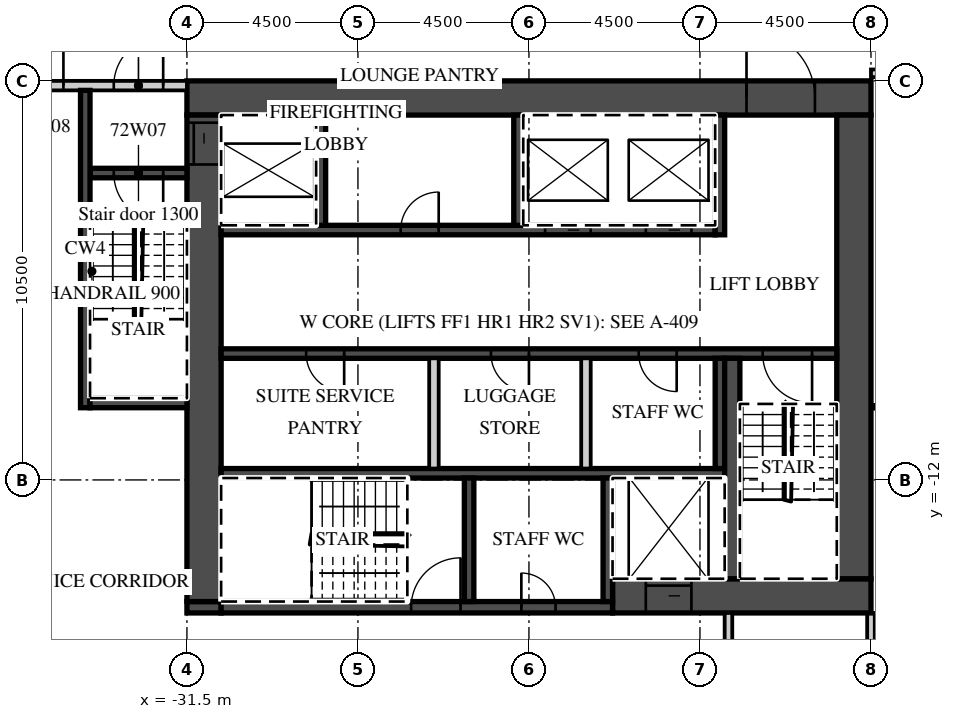
"""IFC4 building model, lengths in metres.
Left out: names, types, materials, properties, quantities, classifications, styles, units other than length and angle.
Written with IfcOpenShell. Run it as: python <this file> out.ifc"""

import sys

from ifc_helpers import new_model, si_unit, direction, frame, frame_2d, origin, place, context, subcontext, project, spatial, rectangle, extrude, element, fill, save


model = new_model("IFC4")
c1 = context("Model", 3, precision=1e-05, world=origin(), true_north=direction((0.0, 1.0)))
c2 = subcontext(c1, "Body", "Model", "MODEL_VIEW")
j1 = project(units=[si_unit("LENGTHUNIT", "METRE"), si_unit("PLANEANGLEUNIT", "RADIAN")], contexts=[c1])
p1 = place(None, origin())
s1 = spatial("IfcSite", under=j1, at=p1, CompositionType="ELEMENT")
p2 = place(p1, origin())
s2 = spatial("IfcBuilding", under=s1, at=p2, CompositionType="ELEMENT")
p3 = place(p2, frame((0.0, 0.0, 288.3)))
s3 = spatial("IfcBuildingStorey", under=s2, at=p3, CompositionType="ELEMENT", Elevation=288.3)
p4 = place(p3, frame((-13.5, -21.396, 0.0), z_axis=(0.0, 0.0, 1.0), x_axis=(0.0, 1.0, 0.0)))
e1 = element("IfcWall", 1, at=p4, inside=s3, PredefinedType="PARTITIONING", context=c2, shape_type="SweptSolid", body=[
    extrude(rectangle(XDim=5.896, YDim=0.2, at=frame_2d((2.948, 0.0))), origin(), (0.0, 0.0, 1.0), 3.02),
])
p5 = place(p3, frame((-13.5, -1.3, 0.0), z_axis=(0.0, 0.0, 1.0), x_axis=(1.0, 0.0, 0.0)))
e2 = element("IfcWall", 2, at=p5, inside=s3, PredefinedType="PARTITIONING", context=c2, shape_type="SweptSolid", body=[
    extrude(rectangle(XDim=50.293, YDim=0.2, at=frame_2d((25.146, 0.0))), origin(), (0.0, 0.0, 1.0), 3.02),
])
p6 = place(p5, frame((0.575, 0.0, 0.0)))
e3 = element("IfcOpeningElement", 3, at=p6, cuts=e2, PredefinedType="OPENING", context=c2, shape_type="SweptSolid", body=[
    extrude(rectangle(XDim=1.0, YDim=2.1, at=frame_2d((0.5, 1.05))), frame((0.0, 0.11, 0.0), z_axis=(0.0, -1.0, 0.0), x_axis=(1.0, 0.0, 0.0)), (0.0, 0.0, 1.0), 0.22),
])
p7 = place(p5, frame((9.863, 0.0, 0.0)))
e4 = element("IfcOpeningElement", 4, at=p7, cuts=e2, PredefinedType="OPENING", context=c2, shape_type="SweptSolid", body=[
    extrude(rectangle(XDim=1.2, YDim=2.1, at=frame_2d((0.6, 1.05))), frame((0.0, 0.11, 0.0), z_axis=(0.0, -1.0, 0.0), x_axis=(1.0, 0.0, 0.0)), (0.0, 0.0, 1.0), 0.22),
])
p8 = place(p5, frame((18.862, 0.0, 0.0)))
e5 = element("IfcOpeningElement", 5, at=p8, cuts=e2, PredefinedType="OPENING", context=c2, shape_type="SweptSolid", body=[
    extrude(rectangle(XDim=1.2, YDim=2.1, at=frame_2d((0.6, 1.05))), frame((0.0, 0.11, 0.0), z_axis=(0.0, -1.0, 0.0), x_axis=(1.0, 0.0, 0.0)), (0.0, 0.0, 1.0), 0.22),
])
p9 = place(p5, frame((25.45, 0.0, 0.0)))
e6 = element("IfcOpeningElement", 6, at=p9, cuts=e2, PredefinedType="OPENING", context=c2, shape_type="SweptSolid", body=[
    extrude(rectangle(XDim=1.0, YDim=2.1, at=frame_2d((0.5, 1.05))), frame((0.0, 0.11, 0.0), z_axis=(0.0, -1.0, 0.0), x_axis=(1.0, 0.0, 0.0)), (0.0, 0.0, 1.0), 0.22),
])
p10 = place(p5, frame((27.55, 0.0, 0.0)))
e7 = element("IfcOpeningElement", 7, at=p10, cuts=e2, PredefinedType="OPENING", context=c2, shape_type="SweptSolid", body=[
    extrude(rectangle(XDim=1.0, YDim=2.1, at=frame_2d((0.5, 1.05))), frame((0.0, 0.11, 0.0), z_axis=(0.0, -1.0, 0.0), x_axis=(1.0, 0.0, 0.0)), (0.0, 0.0, 1.0), 0.22),
])
p11 = place(p5, frame((33.938, 0.0, 0.0)))
e8 = element("IfcOpeningElement", 8, at=p11, cuts=e2, PredefinedType="OPENING", context=c2, shape_type="SweptSolid", body=[
    extrude(rectangle(XDim=1.2, YDim=2.1, at=frame_2d((0.6, 1.05))), frame((0.0, 0.11, 0.0), z_axis=(0.0, -1.0, 0.0), x_axis=(1.0, 0.0, 0.0)), (0.0, 0.0, 1.0), 0.22),
])
p12 = place(p5, frame((42.938, 0.0, 0.0)))
e9 = element("IfcOpeningElement", 9, at=p12, cuts=e2, PredefinedType="OPENING", context=c2, shape_type="SweptSolid", body=[
    extrude(rectangle(XDim=1.2, YDim=2.1, at=frame_2d((0.6, 1.05))), frame((0.0, 0.11, 0.0), z_axis=(0.0, -1.0, 0.0), x_axis=(1.0, 0.0, 0.0)), (0.0, 0.0, 1.0), 0.22),
])
p13 = place(p3, frame((-31.5, -1.95, 0.0), z_axis=(0.0, 0.0, 1.0), x_axis=(1.0, 0.0, 0.0)))
e10 = element("IfcWall", 10, at=p13, inside=s3, PredefinedType="SHEAR", context=c2, shape_type="SweptSolid", body=[
    extrude(rectangle(XDim=18.0, YDim=0.9, at=frame_2d((9.0, 0.0))), origin(), (0.0, 0.0, 1.0), 3.02),
])
p14 = place(p13, frame((14.725, 0.0, 0.0)))
e11 = element("IfcOpeningElement", 11, at=p14, cuts=e10, PredefinedType="OPENING", context=c2, shape_type="SweptSolid", body=[
    extrude(rectangle(XDim=1.8, YDim=2.1, at=frame_2d((0.9, 1.05))), frame((0.0, 0.46, 0.0), z_axis=(0.0, -1.0, 0.0), x_axis=(1.0, 0.0, 0.0)), (0.0, 0.0, 1.0), 0.92),
])
p15 = place(p3, frame((-20.3, -15.05, 0.0), z_axis=(0.0, 0.0, 1.0), x_axis=(1.0, 0.0, 0.0)))
e12 = element("IfcWall", 12, at=p15, inside=s3, PredefinedType="SHEAR", context=c2, shape_type="SweptSolid", body=[
    extrude(rectangle(XDim=6.8, YDim=0.9, at=frame_2d((3.4, 0.0))), origin(), (0.0, 0.0, 1.0), 3.02),
])
p16 = place(p15, frame((0.875, 0.0, 0.0)))
e13 = element("IfcOpeningElement", 13, at=p16, cuts=e12, PredefinedType="OPENING", context=c2, shape_type="SweptSolid", body=[
    extrude(rectangle(XDim=1.2, YDim=2.1, at=frame_2d((0.6, 1.05))), frame((0.0, 0.46, 0.0), z_axis=(0.0, -1.0, 0.0), x_axis=(1.0, 0.0, 0.0)), (0.0, 0.0, 1.0), 0.92),
])
p17 = place(p3, frame((-31.5, -15.35, 0.0), z_axis=(0.0, 0.0, 1.0), x_axis=(1.0, 0.0, 0.0)))
e14 = element("IfcWall", 14, at=p17, inside=s3, PredefinedType="SHEAR", context=c2, shape_type="SweptSolid", body=[
    extrude(rectangle(XDim=0.9, YDim=0.3, at=frame_2d((0.45, 0.0))), origin(), (0.0, 0.0, 1.0), 3.02),
])
p18 = place(p3, frame((-30.6, -15.35, 0.0), z_axis=(0.0, 0.0, 1.0), x_axis=(1.0, 0.0, 0.0)))
e15 = element("IfcWall", 15, at=p18, inside=s3, PredefinedType="SHEAR", context=c2, shape_type="SweptSolid", body=[
    extrude(rectangle(XDim=10.3, YDim=0.3, at=frame_2d((5.15, 0.0))), origin(), (0.0, 0.0, 1.0), 3.02),
])
p19 = place(p18, frame((5.0, 0.0, 0.0)))
e16 = element("IfcOpeningElement", 16, at=p19, cuts=e15, PredefinedType="OPENING", context=c2, shape_type="SweptSolid", body=[
    extrude(rectangle(XDim=1.3, YDim=2.1, at=frame_2d((0.65, 1.05))), frame((0.0, 0.16, 0.0), z_axis=(0.0, -1.0, 0.0), x_axis=(1.0, 0.0, 0.0)), (0.0, 0.0, 1.0), 0.32),
])
p20 = place(p18, frame((7.9, 0.0, 0.0)))
e17 = element("IfcOpeningElement", 17, at=p20, cuts=e15, PredefinedType="OPENING", context=c2, shape_type="SweptSolid", body=[
    extrude(rectangle(XDim=0.9, YDim=2.1, at=frame_2d((0.45, 1.05))), frame((0.0, 0.16, 0.0), z_axis=(0.0, -1.0, 0.0), x_axis=(1.0, 0.0, 0.0)), (0.0, 0.0, 1.0), 0.32),
])
p21 = place(p3, frame((-31.05, -15.2, 0.0), z_axis=(0.0, 0.0, 1.0), x_axis=(0.0, 1.0, 0.0)))
e18 = element("IfcWall", 18, at=p21, inside=s3, PredefinedType="SHEAR", context=c2, shape_type="SweptSolid", body=[
    extrude(rectangle(XDim=12.8, YDim=0.9, at=frame_2d((6.4, 0.0))), origin(), (0.0, 0.0, 1.0), 3.02),
])
p22 = place(p21, frame((11.5, 0.0, 0.0)))
e19 = element("IfcOpeningElement", 19, at=p22, cuts=e18, PredefinedType="OPENING", context=c2, shape_type="SweptSolid", body=[
    extrude(rectangle(XDim=1.1, YDim=2.1, at=frame_2d((0.55, 1.05))), frame((0.0, 0.46, 0.0), z_axis=(0.0, -1.0, 0.0), x_axis=(1.0, 0.0, 0.0)), (0.0, 0.0, 1.0), 0.92),
])
p23 = place(p3, frame((-13.95, -14.6, 0.0), z_axis=(0.0, 0.0, 1.0), x_axis=(0.0, 1.0, 0.0)))
e20 = element("IfcWall", 20, at=p23, inside=s3, PredefinedType="SHEAR", context=c2, shape_type="SweptSolid", body=[
    extrude(rectangle(XDim=12.2, YDim=0.9, at=frame_2d((6.1, 0.0))), origin(), (0.0, 0.0, 1.0), 3.02),
])
p24 = place(p3, frame((-30.6, -5.425, 0.0), z_axis=(0.0, 0.0, 1.0), x_axis=(1.0, 0.0, 0.0)))
e21 = element("IfcWall", 21, at=p24, inside=s3, PredefinedType="SHEAR", context=c2, shape_type="SweptSolid", body=[
    extrude(rectangle(XDim=13.0, YDim=0.25, at=frame_2d((6.5, 0.0))), origin(), (0.0, 0.0, 1.0), 3.02),
])
p25 = place(p24, frame((8.525, 0.0, 0.0)))
e22 = element("IfcOpeningElement", 22, at=p25, cuts=e21, PredefinedType="OPENING", context=c2, shape_type="SweptSolid", body=[
    extrude(rectangle(XDim=1.2, YDim=2.1, at=frame_2d((0.6, 1.05))), frame((0.0, 0.135, 0.0), z_axis=(0.0, -1.0, 0.0), x_axis=(1.0, 0.0, 0.0)), (0.0, 0.0, 1.0), 0.27),
])
p26 = place(p24, frame((11.175, 0.0, 0.0)))
e23 = element("IfcOpeningElement", 23, at=p26, cuts=e21, PredefinedType="OPENING", context=c2, shape_type="SweptSolid", body=[
    extrude(rectangle(XDim=1.2, YDim=2.1, at=frame_2d((0.6, 1.05))), frame((0.0, 0.135, 0.0), z_axis=(0.0, -1.0, 0.0), x_axis=(1.0, 0.0, 0.0)), (0.0, 0.0, 1.0), 0.27),
])
p27 = place(p24, frame((4.725, 0.0, 0.0)))
e24 = element("IfcOpeningElement", 24, at=p27, cuts=e21, PredefinedType="OPENING", context=c2, shape_type="SweptSolid", body=[
    extrude(rectangle(XDim=1.0, YDim=2.1, at=frame_2d((0.5, 1.05))), frame((0.0, 0.135, 0.0), z_axis=(0.0, -1.0, 0.0), x_axis=(1.0, 0.0, 0.0)), (0.0, 0.0, 1.0), 0.27),
])
p28 = place(p3, frame((-17.475, -5.55, 0.0), z_axis=(0.0, 0.0, 1.0), x_axis=(0.0, 1.0, 0.0)))
e25 = element("IfcWall", 25, at=p28, inside=s3, PredefinedType="SHEAR", context=c2, shape_type="SweptSolid", body=[
    extrude(rectangle(XDim=3.15, YDim=0.25, at=frame_2d((1.575, 0.0))), origin(), (0.0, 0.0, 1.0), 3.02),
])
for number, where, z_axis, x_axis in (
    (26, (-27.975, -5.3, 0.0), (0.0, 0.0, 1.0), (0.0, 1.0, 0.0)),
    (27, (-22.775, -5.3, 0.0), (0.0, 0.0, 1.0), (0.0, 1.0, 0.0)),
):
    element("IfcWall", number, at=place(p3, frame(where, z_axis=z_axis, x_axis=x_axis)), inside=s3, PredefinedType="SHEAR", context=c2, shape_type="SweptSolid", body=[
        extrude(rectangle(XDim=2.9, YDim=0.25, at=frame_2d((1.45, 0.0))), origin(), (0.0, 0.0, 1.0), 3.02),
    ])
p29 = place(p3, frame((-30.6, -8.675, 0.0), z_axis=(0.0, 0.0, 1.0), x_axis=(1.0, 0.0, 0.0)))
e28 = element("IfcWall", 28, at=p29, inside=s3, PredefinedType="SHEAR", context=c2, shape_type="SweptSolid", body=[
    extrude(rectangle(XDim=16.2, YDim=0.25, at=frame_2d((8.1, 0.0))), origin(), (0.0, 0.0, 1.0), 3.02),
])
p30 = place(p29, frame((14.25, 0.0, 0.0)))
e29 = element("IfcOpeningElement", 29, at=p30, cuts=e28, PredefinedType="OPENING", context=c2, shape_type="SweptSolid", body=[
    extrude(rectangle(XDim=1.3, YDim=2.1, at=frame_2d((0.65, 1.05))), frame((0.0, 0.135, 0.0), z_axis=(0.0, -1.0, 0.0), x_axis=(1.0, 0.0, 0.0)), (0.0, 0.0, 1.0), 0.27),
])
p31 = place(p29, frame((2.238, 0.0, 0.0)))
e30 = element("IfcOpeningElement", 30, at=p31, cuts=e28, PredefinedType="OPENING", context=c2, shape_type="SweptSolid", body=[
    extrude(rectangle(XDim=1.0, YDim=2.1, at=frame_2d((0.5, 1.05))), frame((0.0, 0.135, 0.0), z_axis=(0.0, -1.0, 0.0), x_axis=(1.0, 0.0, 0.0)), (0.0, 0.0, 1.0), 0.27),
])
p32 = place(p29, frame((7.1, 0.0, 0.0)))
e31 = element("IfcOpeningElement", 31, at=p32, cuts=e28, PredefinedType="OPENING", context=c2, shape_type="SweptSolid", body=[
    extrude(rectangle(XDim=1.0, YDim=2.1, at=frame_2d((0.5, 1.05))), frame((0.0, 0.135, 0.0), z_axis=(0.0, -1.0, 0.0), x_axis=(1.0, 0.0, 0.0)), (0.0, 0.0, 1.0), 0.27),
])
p33 = place(p29, frame((10.988, 0.0, 0.0)))
e32 = element("IfcOpeningElement", 32, at=p33, cuts=e28, PredefinedType="OPENING", context=c2, shape_type="SweptSolid", body=[
    extrude(rectangle(XDim=1.0, YDim=2.1, at=frame_2d((0.5, 1.05))), frame((0.0, 0.135, 0.0), z_axis=(0.0, -1.0, 0.0), x_axis=(1.0, 0.0, 0.0)), (0.0, 0.0, 1.0), 0.27),
])
p34 = place(p3, frame((-30.6, -11.825, 0.0), z_axis=(0.0, 0.0, 1.0), x_axis=(1.0, 0.0, 0.0)))
e33 = element("IfcWall", 33, at=p34, inside=s3, PredefinedType="SHEAR", context=c2, shape_type="SweptSolid", body=[
    extrude(rectangle(XDim=13.25, YDim=0.25, at=frame_2d((6.625, 0.0))), origin(), (0.0, 0.0, 1.0), 3.02),
])
p35 = place(p3, frame((-17.475, -11.7, 0.0), z_axis=(0.0, 0.0, 1.0), x_axis=(0.0, 1.0, 0.0)))
e34 = element("IfcWall", 34, at=p35, inside=s3, PredefinedType="SHEAR", context=c2, shape_type="SweptSolid", body=[
    extrude(rectangle(XDim=2.9, YDim=0.25, at=frame_2d((1.45, 0.0))), origin(), (0.0, 0.0, 1.0), 3.02),
])
for number, where, z_axis, x_axis in (
    (35, (-25.0, -11.7, 0.0), (0.0, 0.0, 1.0), (0.0, 1.0, 0.0)),
    (36, (-21.0, -11.7, 0.0), (0.0, 0.0, 1.0), (0.0, 1.0, 0.0)),
):
    element("IfcWall", number, at=place(p3, frame(where, z_axis=z_axis, x_axis=x_axis)), inside=s3, PredefinedType="PARTITIONING", context=c2, shape_type="SweptSolid", body=[
        extrude(rectangle(XDim=2.9, YDim=0.25, at=frame_2d((1.45, 0.0))), origin(), (0.0, 0.0, 1.0), 3.02),
    ])
p36 = place(p3, frame((-17.15, -14.6, 0.0), z_axis=(0.0, 0.0, 1.0), x_axis=(0.0, 1.0, 0.0)))
e37 = element("IfcWall", 37, at=p36, inside=s3, PredefinedType="SHEAR", context=c2, shape_type="SweptSolid", body=[
    extrude(rectangle(XDim=5.8, YDim=0.4, at=frame_2d((2.9, 0.0))), origin(), (0.0, 0.0, 1.0), 3.02),
])
for number, where, z_axis, x_axis in (
    (38, (-20.425, -15.2, 0.0), (0.0, 0.0, 1.0), (0.0, 1.0, 0.0)),
    (39, (-24.075, -15.2, 0.0), (0.0, 0.0, 1.0), (0.0, 1.0, 0.0)),
):
    element("IfcWall", number, at=place(p3, frame(where, z_axis=z_axis, x_axis=x_axis)), inside=s3, PredefinedType="SHEAR", context=c2, shape_type="SweptSolid", body=[
        extrude(rectangle(XDim=3.25, YDim=0.25, at=frame_2d((1.625, 0.0))), origin(), (0.0, 0.0, 1.0), 3.02),
    ])
p37 = place(p3, frame((-39.627, -1.625, 0.0), z_axis=(0.0, 0.0, 1.0), x_axis=(1.0, 0.0, 0.0)))
e40 = element("IfcWall", 40, at=p37, inside=s3, PredefinedType="PARTITIONING", context=c2, shape_type="SweptSolid", body=[
    extrude(rectangle(XDim=8.127, YDim=0.25, at=frame_2d((4.063, 0.0))), origin(), (0.0, 0.0, 1.0), 3.02),
])
p38 = place(p37, frame((6.202, 0.0, 0.0)))
e41 = element("IfcOpeningElement", 41, at=p38, cuts=e40, PredefinedType="OPENING", context=c2, shape_type="SweptSolid", body=[
    extrude(rectangle(XDim=1.3, YDim=2.1, at=frame_2d((0.65, 1.05))), frame((0.0, 0.135, 0.0), z_axis=(0.0, -1.0, 0.0), x_axis=(1.0, 0.0, 0.0)), (0.0, 0.0, 1.0), 0.27),
])
p39 = place(p37, frame((3.777, 0.0, 0.0)))
e42 = element("IfcOpeningElement", 42, at=p39, cuts=e40, PredefinedType="OPENING", context=c2, shape_type="SweptSolid", body=[
    extrude(rectangle(XDim=1.1, YDim=2.1, at=frame_2d((0.55, 1.05))), frame((0.0, 0.135, 0.0), z_axis=(0.0, -1.0, 0.0), x_axis=(1.0, 0.0, 0.0)), (0.0, 0.0, 1.0), 0.27),
])
p40 = place(p3, frame((-34.05, -3.925, 0.0), z_axis=(0.0, 0.0, 1.0), x_axis=(1.0, 0.0, 0.0)))
e43 = element("IfcWall", 43, at=p40, inside=s3, PredefinedType="SHEAR", context=c2, shape_type="SweptSolid", body=[
    extrude(rectangle(XDim=2.55, YDim=0.25, at=frame_2d((1.275, 0.0))), origin(), (0.0, 0.0, 1.0), 3.02),
])
p41 = place(p40, frame((0.625, 0.0, 0.0)))
e44 = element("IfcOpeningElement", 44, at=p41, cuts=e43, PredefinedType="OPENING", context=c2, shape_type="SweptSolid", body=[
    extrude(rectangle(XDim=1.3, YDim=2.1, at=frame_2d((0.65, 1.05))), frame((0.0, 0.135, 0.0), z_axis=(0.0, -1.0, 0.0), x_axis=(1.0, 0.0, 0.0)), (0.0, 0.0, 1.0), 0.27),
])
p42 = place(p3, frame((-34.175, -10.1, 0.0), z_axis=(0.0, 0.0, 1.0), x_axis=(0.0, 1.0, 0.0)))
e45 = element("IfcWall", 45, at=p42, inside=s3, PredefinedType="SHEAR", context=c2, shape_type="SweptSolid", body=[
    extrude(rectangle(XDim=8.35, YDim=0.25, at=frame_2d((4.175, 0.0))), origin(), (0.0, 0.0, 1.0), 3.02),
])
p43 = place(p3, frame((-34.05, -9.975, 0.0), z_axis=(0.0, 0.0, 1.0), x_axis=(1.0, 0.0, 0.0)))
e46 = element("IfcWall", 46, at=p43, inside=s3, PredefinedType="SHEAR", context=c2, shape_type="SweptSolid", body=[
    extrude(rectangle(XDim=2.55, YDim=0.25, at=frame_2d((1.275, 0.0))), origin(), (0.0, 0.0, 1.0), 3.02),
])
p44 = place(p3, frame((-17.25, -17.7, 0.0), z_axis=(0.0, 0.0, 1.0), x_axis=(0.0, 1.0, 0.0)))
e47 = element("IfcWall", 47, at=p44, inside=s3, PredefinedType="PARTITIONING", context=c2, shape_type="SweptSolid", body=[
    extrude(rectangle(XDim=2.2, YDim=0.2, at=frame_2d((1.1, 0.0))), origin(), (0.0, 0.0, 1.0), 3.02),
])
p45 = place(p25, origin())
e48 = element("IfcDoor", 48, at=p45, inside=s3, OperationType="SLIDING_TO_LEFT", PredefinedType="DOOR", context=c2, shape_type="SweptSolid", body=[
    extrude(rectangle(XDim=1.2, YDim=2.1, at=frame_2d((0.6, 1.05))), frame((0.0, 0.025, 0.0), z_axis=(0.0, -1.0, 0.0), x_axis=(1.0, 0.0, 0.0)), (0.0, 0.0, 1.0), 0.05),
])
fill(e22, e48)
p46 = place(p26, origin())
e49 = element("IfcDoor", 49, at=p46, inside=s3, OperationType="SLIDING_TO_RIGHT", PredefinedType="DOOR", context=c2, shape_type="SweptSolid", body=[
    extrude(rectangle(XDim=1.2, YDim=2.1, at=frame_2d((0.6, 1.05))), frame((0.0, 0.025, 0.0), z_axis=(0.0, -1.0, 0.0), x_axis=(1.0, 0.0, 0.0)), (0.0, 0.0, 1.0), 0.05),
])
fill(e23, e49)
p47 = place(p16, origin())
e50 = element("IfcDoor", 50, at=p47, inside=s3, OperationType="SLIDING_TO_LEFT", PredefinedType="DOOR", context=c2, shape_type="SweptSolid", body=[
    extrude(rectangle(XDim=1.2, YDim=2.1, at=frame_2d((0.6, 1.05))), frame((0.0, 0.025, 0.0), z_axis=(0.0, -1.0, 0.0), x_axis=(1.0, 0.0, 0.0)), (0.0, 0.0, 1.0), 0.05),
])
fill(e13, e50)
p48 = place(p22, origin())
e51 = element("IfcDoor", 51, at=p48, inside=s3, OperationType="SLIDING_TO_RIGHT", PredefinedType="DOOR", context=c2, shape_type="SweptSolid", body=[
    extrude(rectangle(XDim=1.1, YDim=2.1, at=frame_2d((0.55, 1.05))), frame((0.0, 0.025, 0.0), z_axis=(0.0, -1.0, 0.0), x_axis=(1.0, 0.0, 0.0)), (0.0, 0.0, 1.0), 0.05),
])
fill(e19, e51)
p49 = place(p14, origin())
e52 = element("IfcDoor", 52, at=p49, inside=s3, OperationType="DOUBLE_DOOR_DOUBLE_SWING", PredefinedType="DOOR", context=c2, shape_type="SweptSolid", body=[
    extrude(rectangle(XDim=1.8, YDim=2.1, at=frame_2d((0.9, 1.05))), frame((0.0, 0.025, 0.0), z_axis=(0.0, -1.0, 0.0), x_axis=(1.0, 0.0, 0.0)), (0.0, 0.0, 1.0), 0.05),
])
fill(e11, e52)
p50 = place(p38, origin())
e53 = element("IfcDoor", 53, at=p50, inside=s3, OperationType="SINGLE_SWING_RIGHT", PredefinedType="DOOR", context=c2, shape_type="SweptSolid", body=[
    extrude(rectangle(XDim=1.3, YDim=2.1, at=frame_2d((0.65, 1.05))), frame((0.0, 0.025, 0.0), z_axis=(0.0, -1.0, 0.0), x_axis=(1.0, 0.0, 0.0)), (0.0, 0.0, 1.0), 0.05),
])
fill(e41, e53)
p51 = place(p41, origin())
e54 = element("IfcDoor", 54, at=p51, inside=s3, OperationType="SINGLE_SWING_RIGHT", PredefinedType="DOOR", context=c2, shape_type="SweptSolid", body=[
    extrude(rectangle(XDim=1.3, YDim=2.1, at=frame_2d((0.65, 1.05))), frame((0.0, 0.025, 0.0), z_axis=(0.0, -1.0, 0.0), x_axis=(1.0, 0.0, 0.0)), (0.0, 0.0, 1.0), 0.05),
])
fill(e44, e54)
p52 = place(p39, origin())
e55 = element("IfcDoor", 55, at=p52, inside=s3, OperationType="SINGLE_SWING_RIGHT", PredefinedType="DOOR", context=c2, shape_type="SweptSolid", body=[
    extrude(rectangle(XDim=1.1, YDim=2.1, at=frame_2d((0.55, 1.05))), frame((0.0, 0.025, 0.0), z_axis=(0.0, -1.0, 0.0), x_axis=(1.0, 0.0, 0.0)), (0.0, 0.0, 1.0), 0.05),
])
fill(e42, e55)
p53 = place(p30, origin())
e56 = element("IfcDoor", 56, at=p53, inside=s3, OperationType="SINGLE_SWING_RIGHT", PredefinedType="DOOR", context=c2, shape_type="SweptSolid", body=[
    extrude(rectangle(XDim=1.3, YDim=2.1, at=frame_2d((0.65, 1.05))), frame((0.0, 0.025, 0.0), z_axis=(0.0, -1.0, 0.0), x_axis=(1.0, 0.0, 0.0)), (0.0, 0.0, 1.0), 0.05),
])
fill(e29, e56)
p54 = place(p19, origin())
e57 = element("IfcDoor", 57, at=p54, inside=s3, OperationType="SINGLE_SWING_RIGHT", PredefinedType="DOOR", context=c2, shape_type="SweptSolid", body=[
    extrude(rectangle(XDim=1.3, YDim=2.1, at=frame_2d((0.65, 1.05))), frame((0.0, 0.025, 0.0), z_axis=(0.0, -1.0, 0.0), x_axis=(1.0, 0.0, 0.0)), (0.0, 0.0, 1.0), 0.05),
])
fill(e16, e57)
p55 = place(p20, origin())
e58 = element("IfcDoor", 58, at=p55, inside=s3, OperationType="SINGLE_SWING_LEFT", PredefinedType="DOOR", context=c2, shape_type="SweptSolid", body=[
    extrude(rectangle(XDim=0.9, YDim=2.1, at=frame_2d((0.45, 1.05))), frame((0.0, 0.025, 0.0), z_axis=(0.0, -1.0, 0.0), x_axis=(1.0, 0.0, 0.0)), (0.0, 0.0, 1.0), 0.05),
])
fill(e17, e58)
p56 = place(p31, origin())
e59 = element("IfcDoor", 59, at=p56, inside=s3, OperationType="SINGLE_SWING_RIGHT", PredefinedType="DOOR", context=c2, shape_type="SweptSolid", body=[
    extrude(rectangle(XDim=1.0, YDim=2.1, at=frame_2d((0.5, 1.05))), frame((0.0, 0.025, 0.0), z_axis=(0.0, -1.0, 0.0), x_axis=(1.0, 0.0, 0.0)), (0.0, 0.0, 1.0), 0.05),
])
fill(e30, e59)
p57 = place(p32, origin())
e60 = element("IfcDoor", 60, at=p57, inside=s3, OperationType="SINGLE_SWING_RIGHT", PredefinedType="DOOR", context=c2, shape_type="SweptSolid", body=[
    extrude(rectangle(XDim=1.0, YDim=2.1, at=frame_2d((0.5, 1.05))), frame((0.0, 0.025, 0.0), z_axis=(0.0, -1.0, 0.0), x_axis=(1.0, 0.0, 0.0)), (0.0, 0.0, 1.0), 0.05),
])
fill(e31, e60)
p58 = place(p33, origin())
e61 = element("IfcDoor", 61, at=p58, inside=s3, OperationType="SINGLE_SWING_RIGHT", PredefinedType="DOOR", context=c2, shape_type="SweptSolid", body=[
    extrude(rectangle(XDim=1.0, YDim=2.1, at=frame_2d((0.5, 1.05))), frame((0.0, 0.025, 0.0), z_axis=(0.0, -1.0, 0.0), x_axis=(1.0, 0.0, 0.0)), (0.0, 0.0, 1.0), 0.05),
])
fill(e32, e61)
p59 = place(p27, origin())
e62 = element("IfcDoor", 62, at=p59, inside=s3, OperationType="SINGLE_SWING_RIGHT", PredefinedType="DOOR", context=c2, shape_type="SweptSolid", body=[
    extrude(rectangle(XDim=1.0, YDim=2.1, at=frame_2d((0.5, 1.05))), frame((0.0, 0.025, 0.0), z_axis=(0.0, -1.0, 0.0), x_axis=(1.0, 0.0, 0.0)), (0.0, 0.0, 1.0), 0.05),
])
fill(e24, e62)
save(model, sys.argv[1])
